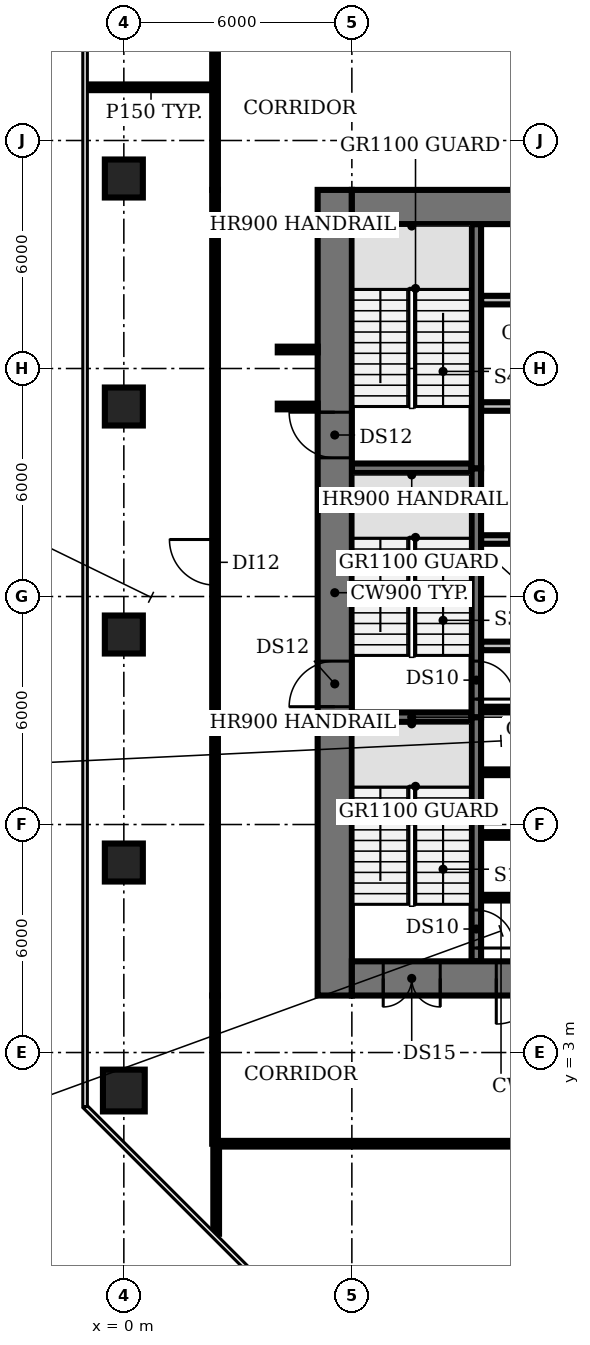
"""IFC4 building model, lengths in metres.
Left out: names, types, materials, properties, quantities, classifications, styles, units other than length and angle.
Written with IfcOpenShell. Run it as: python <this file> out.ifc"""

import sys

from ifc_helpers import new_model, si_unit, direction, frame, frame_2d, origin, origin_2d, place, context, subcontext, project, spatial, rectangle, circle, extrude, element, fill, save


model = new_model("IFC4")
c1 = context("Model", 3, precision=1e-05, world=origin(), true_north=direction((0.0, 1.0)))
c2 = subcontext(c1, "Body", "Model", "MODEL_VIEW")
j1 = project(units=[si_unit("LENGTHUNIT", "METRE"), si_unit("PLANEANGLEUNIT", "RADIAN")], contexts=[c1])
p1 = place(None, origin())
s1 = spatial("IfcSite", under=j1, at=p1, CompositionType="ELEMENT")
p2 = place(p1, origin())
s2 = spatial("IfcBuilding", under=s1, at=p2, CompositionType="ELEMENT")
p3 = place(p2, frame((0.0, 0.0, 15.5)))
s3 = spatial("IfcBuildingStorey", under=s2, at=p3, CompositionType="ELEMENT", Elevation=15.5)
p4 = place(p3, frame((0.0, 2.0, 0.0), z_axis=(0.0, 0.0, 1.0), x_axis=(1.0, 0.0, 0.0)))
e1 = element("IfcColumn", 1, at=p4, inside=s3, PredefinedType="COLUMN", context=c2, shape_type="SweptSolid", body=[
    extrude(circle(Radius=0.55, at=origin_2d()), origin(), (0.0, 0.0, 1.0), 4.15),
])
for number, where, z_axis, x_axis in (
    (2, (0.0, 8.0, 0.0), (0.0, 0.0, 1.0), (1.0, 0.0, 0.0)),
    (3, (0.0, 14.0, 0.0), (0.0, 0.0, 1.0), (1.0, 0.0, 0.0)),
    (4, (0.0, 20.0, 0.0), (0.0, 0.0, 1.0), (1.0, 0.0, 0.0)),
    (5, (0.0, 26.0, 0.0), (0.0, 0.0, 1.0), (1.0, 0.0, 0.0)),
):
    element("IfcColumn", number, at=place(p3, frame(where, z_axis=z_axis, x_axis=x_axis)), inside=s3, PredefinedType="COLUMN", context=c2, shape_type="SweptSolid", body=[
        extrude(rectangle(XDim=1.0, YDim=1.0, at=origin_2d()), origin(), (0.0, 0.0, 1.0), 4.15),
    ])
for number, where, z_axis, x_axis in (
    (6, (9.4, 7.075, 0.0), (0.0, 0.0, 1.0), (1.0, 0.0, 0.0)),
    (7, (9.4, 8.725, 0.0), (0.0, 0.0, 1.0), (1.0, 0.0, 0.0)),
    (8, (9.4, 10.375, 0.0), (0.0, 0.0, 1.0), (1.0, 0.0, 0.0)),
):
    element("IfcWall", number, at=place(p3, frame(where, z_axis=z_axis, x_axis=x_axis)), inside=s3, PredefinedType="SHEAR", context=c2, shape_type="SweptSolid", body=[
        extrude(rectangle(XDim=1.05, YDim=0.15, at=frame_2d((0.525, 0.0))), origin(), (0.0, 0.0, 1.0), 4.15),
    ])
p5 = place(p3, frame((6.0, 11.825, 0.0), z_axis=(0.0, 0.0, 1.0), x_axis=(1.0, 0.0, 0.0)))
e9 = element("IfcWall", 9, at=p5, inside=s3, PredefinedType="SHEAR", context=c2, shape_type="SweptSolid", body=[
    extrude(rectangle(XDim=3.15, YDim=0.25, at=frame_2d((1.575, 0.0))), origin(), (0.0, 0.0, 1.0), 4.15),
])
p6 = place(p3, frame((9.4, 12.025, 0.0), z_axis=(0.0, 0.0, 1.0), x_axis=(1.0, 0.0, 0.0)))
e10 = element("IfcWall", 10, at=p6, inside=s3, PredefinedType="SHEAR", context=c2, shape_type="SweptSolid", body=[
    extrude(rectangle(XDim=1.05, YDim=0.15, at=frame_2d((0.525, 0.0))), origin(), (0.0, 0.0, 1.0), 4.15),
])
p7 = place(p3, frame((9.4, 13.7, 0.0), z_axis=(0.0, 0.0, 1.0), x_axis=(1.0, 0.0, 0.0)))
e11 = element("IfcWall", 11, at=p7, inside=s3, PredefinedType="PARTITIONING", context=c2, shape_type="SweptSolid", body=[
    extrude(rectangle(XDim=4.0, YDim=0.225, at=frame_2d((2.0, 0.0))), origin(), (0.0, 0.0, 1.0), 4.15),
])
p8 = place(p3, frame((9.4, 16.5, 0.0), z_axis=(0.0, 0.0, 1.0), x_axis=(1.0, 0.0, 0.0)))
e12 = element("IfcWall", 12, at=p8, inside=s3, PredefinedType="PARTITIONING", context=c2, shape_type="SweptSolid", body=[
    extrude(rectangle(XDim=14.6, YDim=0.225, at=frame_2d((7.3, 0.0))), origin(), (0.0, 0.0, 1.0), 4.15),
])
p9 = place(p8, frame((0.75, 0.0, 0.0)))
e13 = element("IfcOpeningElement", 13, at=p9, cuts=e12, PredefinedType="OPENING", context=c2, shape_type="SweptSolid", body=[
    extrude(rectangle(XDim=1.1, YDim=2.1, at=frame_2d((0.55, 1.05))), frame((0.0, 0.123, 0.0), z_axis=(0.0, -1.0, 0.0), x_axis=(1.0, 0.0, 0.0)), (0.0, 0.0, 1.0), 0.245),
])
p10 = place(p8, frame((3.55, 0.0, 0.0)))
e14 = element("IfcOpeningElement", 14, at=p10, cuts=e12, PredefinedType="OPENING", context=c2, shape_type="SweptSolid", body=[
    extrude(rectangle(XDim=1.1, YDim=2.1, at=frame_2d((0.55, 1.05))), frame((0.0, 0.123, 0.0), z_axis=(0.0, -1.0, 0.0), x_axis=(1.0, 0.0, 0.0)), (0.0, 0.0, 1.0), 0.245),
])
p11 = place(p8, frame((6.35, 0.0, 0.0)))
e15 = element("IfcOpeningElement", 15, at=p11, cuts=e12, PredefinedType="OPENING", context=c2, shape_type="SweptSolid", body=[
    extrude(rectangle(XDim=1.1, YDim=2.1, at=frame_2d((0.55, 1.05))), frame((0.0, 0.123, 0.0), z_axis=(0.0, -1.0, 0.0), x_axis=(1.0, 0.0, 0.0)), (0.0, 0.0, 1.0), 0.245),
])
p12 = place(p8, frame((9.15, 0.0, 0.0)))
e16 = element("IfcOpeningElement", 16, at=p12, cuts=e12, PredefinedType="OPENING", context=c2, shape_type="SweptSolid", body=[
    extrude(rectangle(XDim=1.1, YDim=2.1, at=frame_2d((0.55, 1.05))), frame((0.0, 0.123, 0.0), z_axis=(0.0, -1.0, 0.0), x_axis=(1.0, 0.0, 0.0)), (0.0, 0.0, 1.0), 0.245),
])
p13 = place(p8, frame((11.647, 0.0, 0.0)))
e17 = element("IfcOpeningElement", 17, at=p13, cuts=e12, PredefinedType="OPENING", context=c2, shape_type="SweptSolid", body=[
    extrude(rectangle(XDim=0.9, YDim=2.1, at=frame_2d((0.45, 1.05))), frame((0.0, 0.123, 0.0), z_axis=(0.0, -1.0, 0.0), x_axis=(1.0, 0.0, 0.0)), (0.0, 0.0, 1.0), 0.245),
])
p14 = place(p8, frame((13.423, 0.0, 0.0)))
e18 = element("IfcOpeningElement", 18, at=p14, cuts=e12, PredefinedType="OPENING", context=c2, shape_type="SweptSolid", body=[
    extrude(rectangle(XDim=0.9, YDim=2.1, at=frame_2d((0.45, 1.05))), frame((0.0, 0.123, 0.0), z_axis=(0.0, -1.0, 0.0), x_axis=(1.0, 0.0, 0.0)), (0.0, 0.0, 1.0), 0.245),
])
p15 = place(p3, frame((6.0, 18.375, 0.0), z_axis=(0.0, 0.0, 1.0), x_axis=(1.0, 0.0, 0.0)))
e19 = element("IfcWall", 19, at=p15, inside=s3, PredefinedType="SHEAR", context=c2, shape_type="SweptSolid", body=[
    extrude(rectangle(XDim=3.15, YDim=0.25, at=frame_2d((1.575, 0.0))), origin(), (0.0, 0.0, 1.0), 4.15),
])
p16 = place(p3, frame((24.0, 20.0, 0.0), z_axis=(0.0, 0.0, 1.0), x_axis=(-1.0, 0.0, 0.0)))
e20 = element("IfcWall", 20, at=p16, inside=s3, PredefinedType="PARTITIONING", context=c2, shape_type="SweptSolid", body=[
    extrude(rectangle(XDim=14.6, YDim=0.225, at=frame_2d((7.3, 0.0))), origin(), (0.0, 0.0, 1.0), 4.15),
])
p17 = place(p16, frame((12.2, 0.0, 0.0)))
e21 = element("IfcOpeningElement", 21, at=p17, cuts=e20, PredefinedType="OPENING", context=c2, shape_type="SweptSolid", body=[
    extrude(rectangle(XDim=1.0, YDim=2.1, at=frame_2d((0.5, 1.05))), frame((0.0, 0.123, 0.0), z_axis=(0.0, -1.0, 0.0), x_axis=(1.0, 0.0, 0.0)), (0.0, 0.0, 1.0), 0.245),
])
p18 = place(p16, frame((9.025, 0.0, 0.0)))
e22 = element("IfcOpeningElement", 22, at=p18, cuts=e20, PredefinedType="OPENING", context=c2, shape_type="SweptSolid", body=[
    extrude(rectangle(XDim=0.9, YDim=2.1, at=frame_2d((0.45, 1.05))), frame((0.0, 0.123, 0.0), z_axis=(0.0, -1.0, 0.0), x_axis=(1.0, 0.0, 0.0)), (0.0, 0.0, 1.0), 0.245),
])
p19 = place(p16, frame((5.375, 0.0, 0.0)))
e23 = element("IfcOpeningElement", 23, at=p19, cuts=e20, PredefinedType="OPENING", context=c2, shape_type="SweptSolid", body=[
    extrude(rectangle(XDim=1.0, YDim=2.1, at=frame_2d((0.5, 1.05))), frame((0.0, 0.123, 0.0), z_axis=(0.0, -1.0, 0.0), x_axis=(1.0, 0.0, 0.0)), (0.0, 0.0, 1.0), 0.245),
])
p20 = place(p16, frame((2.137, 0.0, 0.0)))
e24 = element("IfcOpeningElement", 24, at=p20, cuts=e20, PredefinedType="OPENING", context=c2, shape_type="SweptSolid", body=[
    extrude(rectangle(XDim=0.9, YDim=2.1, at=frame_2d((0.45, 1.05))), frame((0.0, 0.123, 0.0), z_axis=(0.0, -1.0, 0.0), x_axis=(1.0, 0.0, 0.0)), (0.0, 0.0, 1.0), 0.245),
])
p21 = place(p16, frame((0.363, 0.0, 0.0)))
e25 = element("IfcOpeningElement", 25, at=p21, cuts=e20, PredefinedType="OPENING", context=c2, shape_type="SweptSolid", body=[
    extrude(rectangle(XDim=0.9, YDim=2.1, at=frame_2d((0.45, 1.05))), frame((0.0, 0.123, 0.0), z_axis=(0.0, -1.0, 0.0), x_axis=(1.0, 0.0, 0.0)), (0.0, 0.0, 1.0), 0.245),
])
p22 = place(p3, frame((9.4, 22.8, 0.0), z_axis=(0.0, 0.0, 1.0), x_axis=(1.0, 0.0, 0.0)))
e26 = element("IfcWall", 26, at=p22, inside=s3, PredefinedType="PARTITIONING", context=c2, shape_type="SweptSolid", body=[
    extrude(rectangle(XDim=14.6, YDim=0.225, at=frame_2d((7.3, 0.0))), origin(), (0.0, 0.0, 1.0), 4.15),
])
p23 = place(p3, frame((9.275, 11.825, 0.0), z_axis=(0.0, 0.0, 1.0), x_axis=(0.0, -1.0, 0.0)))
e27 = element("IfcWall", 27, at=p23, inside=s3, PredefinedType="SHEAR", context=c2, shape_type="SweptSolid", body=[
    extrude(rectangle(XDim=6.425, YDim=0.25, at=frame_2d((3.212, 0.0))), origin(), (0.0, 0.0, 1.0), 4.15),
])
p24 = place(p23, frame((5.075, 0.0, 0.0)))
e28 = element("IfcOpeningElement", 28, at=p24, cuts=e27, PredefinedType="OPENING", context=c2, shape_type="SweptSolid", body=[
    extrude(rectangle(XDim=1.0, YDim=2.1, at=frame_2d((0.5, 1.05))), frame((0.0, 0.135, 0.0), z_axis=(0.0, -1.0, 0.0), x_axis=(1.0, 0.0, 0.0)), (0.0, 0.0, 1.0), 0.27),
])
p25 = place(p3, frame((9.275, 18.375, 0.0), z_axis=(0.0, 0.0, 1.0), x_axis=(0.0, -1.0, 0.0)))
e29 = element("IfcWall", 29, at=p25, inside=s3, PredefinedType="SHEAR", context=c2, shape_type="SweptSolid", body=[
    extrude(rectangle(XDim=6.55, YDim=0.25, at=frame_2d((3.275, 0.0))), origin(), (0.0, 0.0, 1.0), 4.15),
])
p26 = place(p25, frame((5.075, 0.0, 0.0)))
e30 = element("IfcOpeningElement", 30, at=p26, cuts=e29, PredefinedType="OPENING", context=c2, shape_type="SweptSolid", body=[
    extrude(rectangle(XDim=1.0, YDim=2.1, at=frame_2d((0.5, 1.05))), frame((0.0, 0.135, 0.0), z_axis=(0.0, -1.0, 0.0), x_axis=(1.0, 0.0, 0.0)), (0.0, 0.0, 1.0), 0.27),
])
p27 = place(p3, frame((9.275, 18.375, 0.0), z_axis=(0.0, 0.0, 1.0), x_axis=(0.0, 1.0, 0.0)))
e31 = element("IfcWall", 31, at=p27, inside=s3, PredefinedType="SHEAR", context=c2, shape_type="SweptSolid", body=[
    extrude(rectangle(XDim=6.425, YDim=0.25, at=frame_2d((3.212, 0.0))), origin(), (0.0, 0.0, 1.0), 4.15),
])
p28 = place(p3, frame((5.55, 4.5, 0.0), z_axis=(0.0, 0.0, 1.0), x_axis=(0.0, 1.0, 0.0)))
e32 = element("IfcWall", 32, at=p28, inside=s3, PredefinedType="SHEAR", context=c2, shape_type="SweptSolid", body=[
    extrude(rectangle(XDim=21.2, YDim=0.9, at=frame_2d((10.6, 0.0))), origin(), (0.0, 0.0, 1.0), 4.15),
])
p29 = place(p28, frame((7.6, 0.0, 0.0)))
e33 = element("IfcOpeningElement", 33, at=p29, cuts=e32, PredefinedType="OPENING", context=c2, shape_type="SweptSolid", body=[
    extrude(rectangle(XDim=1.2, YDim=2.1, at=frame_2d((0.6, 1.05))), frame((0.0, 0.46, 0.0), z_axis=(0.0, -1.0, 0.0), x_axis=(1.0, 0.0, 0.0)), (0.0, 0.0, 1.0), 0.92),
])
p30 = place(p28, frame((14.15, 0.0, 0.0)))
e34 = element("IfcOpeningElement", 34, at=p30, cuts=e32, PredefinedType="OPENING", context=c2, shape_type="SweptSolid", body=[
    extrude(rectangle(XDim=1.2, YDim=2.1, at=frame_2d((0.6, 1.05))), frame((0.0, 0.46, 0.0), z_axis=(0.0, -1.0, 0.0), x_axis=(1.0, 0.0, 0.0)), (0.0, 0.0, 1.0), 0.92),
])
p31 = place(p3, frame((24.0, 4.95, 0.0), z_axis=(0.0, 0.0, 1.0), x_axis=(-1.0, 0.0, 0.0)))
e35 = element("IfcWall", 35, at=p31, inside=s3, PredefinedType="SHEAR", context=c2, shape_type="SweptSolid", body=[
    extrude(rectangle(XDim=18.0, YDim=0.9, at=frame_2d((9.0, 0.0))), origin(), (0.0, 0.0, 1.0), 4.15),
])
p32 = place(p31, frame((15.675, 0.0, 0.0)))
e36 = element("IfcOpeningElement", 36, at=p32, cuts=e35, PredefinedType="OPENING", context=c2, shape_type="SweptSolid", body=[
    extrude(rectangle(XDim=1.5, YDim=2.1, at=frame_2d((0.75, 1.05))), frame((0.0, 0.46, 0.0), z_axis=(0.0, -1.0, 0.0), x_axis=(1.0, 0.0, 0.0)), (0.0, 0.0, 1.0), 0.92),
])
p33 = place(p31, frame((0.825, 0.0, 0.0)))
e37 = element("IfcOpeningElement", 37, at=p33, cuts=e35, PredefinedType="OPENING", context=c2, shape_type="SweptSolid", body=[
    extrude(rectangle(XDim=1.5, YDim=2.1, at=frame_2d((0.75, 1.05))), frame((0.0, 0.46, 0.0), z_axis=(0.0, -1.0, 0.0), x_axis=(1.0, 0.0, 0.0)), (0.0, 0.0, 1.0), 0.92),
])
p34 = place(p31, frame((13.0, 0.0, 0.0)))
e38 = element("IfcOpeningElement", 38, at=p34, cuts=e35, PredefinedType="OPENING", context=c2, shape_type="SweptSolid", body=[
    extrude(rectangle(XDim=1.2, YDim=2.1, at=frame_2d((0.6, 1.05))), frame((0.0, 0.46, 0.0), z_axis=(0.0, -1.0, 0.0), x_axis=(1.0, 0.0, 0.0)), (0.0, 0.0, 1.0), 0.92),
])
p35 = place(p31, frame((4.9, 0.0, 0.0)))
e39 = element("IfcOpeningElement", 39, at=p35, cuts=e35, PredefinedType="OPENING", context=c2, shape_type="SweptSolid", body=[
    extrude(rectangle(XDim=1.0, YDim=2.1, at=frame_2d((0.5, 1.05))), frame((0.0, 0.46, 0.0), z_axis=(0.0, -1.0, 0.0), x_axis=(1.0, 0.0, 0.0)), (0.0, 0.0, 1.0), 0.92),
])
p36 = place(p3, frame((6.0, 25.25, 0.0), z_axis=(0.0, 0.0, 1.0), x_axis=(1.0, 0.0, 0.0)))
e40 = element("IfcWall", 40, at=p36, inside=s3, PredefinedType="SHEAR", context=c2, shape_type="SweptSolid", body=[
    extrude(rectangle(XDim=18.0, YDim=0.9, at=frame_2d((9.0, 0.0))), origin(), (0.0, 0.0, 1.0), 4.15),
])
p37 = place(p3, frame((-0.97, 28.4, 0.0), z_axis=(0.0, 0.0, 1.0), x_axis=(1.0, 0.0, 0.0)))
e41 = element("IfcWall", 41, at=p37, inside=s3, PredefinedType="PARTITIONING", context=c2, shape_type="SweptSolid", body=[
    extrude(rectangle(XDim=3.37, YDim=0.15, at=frame_2d((1.685, 0.0))), origin(), (0.0, 0.0, 1.0), 3.08),
])
p38 = place(p3, frame((2.4, 0.6, 0.0), z_axis=(0.0, 0.0, 1.0), x_axis=(0.0, 1.0, 0.0)))
e42 = element("IfcWall", 42, at=p38, inside=s3, PredefinedType="PARTITIONING", context=c2, shape_type="SweptSolid", body=[
    extrude(rectangle(XDim=3.9, YDim=0.15, at=frame_2d((1.95, 0.0))), origin(), (0.0, 0.0, 1.0), 3.08),
])
p39 = place(p3, frame((2.4, 4.5, 0.0), z_axis=(0.0, 0.0, 1.0), x_axis=(0.0, 1.0, 0.0)))
e43 = element("IfcWall", 43, at=p39, inside=s3, PredefinedType="PARTITIONING", context=c2, shape_type="SweptSolid", body=[
    extrude(rectangle(XDim=21.2, YDim=0.15, at=frame_2d((10.6, 0.0))), origin(), (0.0, 0.0, 1.0), 3.08),
])
p40 = place(p39, frame((10.8, 0.0, 0.0)))
e44 = element("IfcOpeningElement", 44, at=p40, cuts=e43, PredefinedType="OPENING", context=c2, shape_type="SweptSolid", body=[
    extrude(rectangle(XDim=1.2, YDim=2.1, at=frame_2d((0.6, 1.05))), frame((0.0, 0.085, 0.0), z_axis=(0.0, -1.0, 0.0), x_axis=(1.0, 0.0, 0.0)), (0.0, 0.0, 1.0), 0.17),
])
p41 = place(p3, frame((2.4, 25.7, 0.0), z_axis=(0.0, 0.0, 1.0), x_axis=(0.0, 1.0, 0.0)))
e45 = element("IfcWall", 45, at=p41, inside=s3, PredefinedType="PARTITIONING", context=c2, shape_type="SweptSolid", body=[
    extrude(rectangle(XDim=3.9, YDim=0.15, at=frame_2d((1.95, 0.0))), origin(), (0.0, 0.0, 1.0), 3.08),
])
p42 = place(p3, frame((2.43, -1.77, 0.0), z_axis=(0.0, 0.0, 1.0), x_axis=(0.0, 1.0, 0.0)))
e46 = element("IfcWall", 46, at=p42, inside=s3, PredefinedType="PARTITIONING", context=c2, shape_type="SweptSolid", body=[
    extrude(rectangle(XDim=2.37, YDim=0.15, at=frame_2d((1.185, 0.0))), origin(), (0.0, 0.0, 1.0), 3.08),
])
for number, where, z_axis, x_axis in (
    (47, (4.05, 20.0, 0.0), (0.0, 0.0, 1.0), (1.0, 0.0, 0.0)),
    (48, (4.05, 21.5, 0.0), (0.0, 0.0, 1.0), (1.0, 0.0, 0.0)),
):
    element("IfcWall", number, at=place(p3, frame(where, z_axis=z_axis, x_axis=x_axis)), inside=s3, PredefinedType="PARTITIONING", context=c2, shape_type="SweptSolid", body=[
        extrude(rectangle(XDim=1.05, YDim=0.15, at=frame_2d((0.525, 0.0))), origin(), (0.0, 0.0, 1.0), 3.08),
    ])
p43 = place(p3, frame((27.6, 0.6, 0.0), z_axis=(0.0, 0.0, 1.0), x_axis=(-1.0, 0.0, 0.0)))
e49 = element("IfcWall", 49, at=p43, inside=s3, PredefinedType="PARTITIONING", context=c2, shape_type="SweptSolid", body=[
    extrude(rectangle(XDim=25.2, YDim=0.15, at=frame_2d((12.6, 0.0))), origin(), (0.0, 0.0, 1.0), 3.08),
])
p44 = place(p43, frame((12.1, 0.0, 0.0)))
e50 = element("IfcOpeningElement", 50, at=p44, cuts=e49, PredefinedType="OPENING", context=c2, shape_type="SweptSolid", body=[
    extrude(rectangle(XDim=1.2, YDim=2.1, at=frame_2d((0.6, 1.05))), frame((0.0, 0.085, 0.0), z_axis=(0.0, -1.0, 0.0), x_axis=(1.0, 0.0, 0.0)), (0.0, 0.0, 1.0), 0.17),
])
p45 = place(p24, origin())
e51 = element("IfcDoor", 51, at=p45, inside=s3, OperationType="SINGLE_SWING_RIGHT", PredefinedType="DOOR", context=c2, shape_type="SweptSolid", body=[
    extrude(rectangle(XDim=1.0, YDim=2.1, at=frame_2d((0.5, 1.05))), frame((0.0, 0.025, 0.0), z_axis=(0.0, -1.0, 0.0), x_axis=(1.0, 0.0, 0.0)), (0.0, 0.0, 1.0), 0.05),
])
fill(e28, e51)
p46 = place(p26, origin())
e52 = element("IfcDoor", 52, at=p46, inside=s3, OperationType="SINGLE_SWING_RIGHT", PredefinedType="DOOR", context=c2, shape_type="SweptSolid", body=[
    extrude(rectangle(XDim=1.0, YDim=2.1, at=frame_2d((0.5, 1.05))), frame((0.0, 0.025, 0.0), z_axis=(0.0, -1.0, 0.0), x_axis=(1.0, 0.0, 0.0)), (0.0, 0.0, 1.0), 0.05),
])
fill(e30, e52)
p47 = place(p29, origin())
e53 = element("IfcDoor", 53, at=p47, inside=s3, OperationType="SINGLE_SWING_LEFT", PredefinedType="DOOR", context=c2, shape_type="SweptSolid", body=[
    extrude(rectangle(XDim=1.2, YDim=2.1, at=frame_2d((0.6, 1.05))), frame((0.0, 0.025, 0.0), z_axis=(0.0, -1.0, 0.0), x_axis=(1.0, 0.0, 0.0)), (0.0, 0.0, 1.0), 0.05),
])
fill(e33, e53)
p48 = place(p30, origin())
e54 = element("IfcDoor", 54, at=p48, inside=s3, OperationType="SINGLE_SWING_RIGHT", PredefinedType="DOOR", context=c2, shape_type="SweptSolid", body=[
    extrude(rectangle(XDim=1.2, YDim=2.1, at=frame_2d((0.6, 1.05))), frame((0.0, 0.025, 0.0), z_axis=(0.0, -1.0, 0.0), x_axis=(1.0, 0.0, 0.0)), (0.0, 0.0, 1.0), 0.05),
])
fill(e34, e54)
p49 = place(p32, origin())
e55 = element("IfcDoor", 55, at=p49, inside=s3, OperationType="DOUBLE_DOOR_SINGLE_SWING", PredefinedType="DOOR", context=c2, shape_type="SweptSolid", body=[
    extrude(rectangle(XDim=1.5, YDim=2.1, at=frame_2d((0.75, 1.05))), frame((0.0, 0.025, 0.0), z_axis=(0.0, -1.0, 0.0), x_axis=(1.0, 0.0, 0.0)), (0.0, 0.0, 1.0), 0.05),
])
fill(e36, e55)
p50 = place(p34, origin())
e56 = element("IfcDoor", 56, at=p50, inside=s3, OperationType="SINGLE_SWING_RIGHT", PredefinedType="DOOR", context=c2, shape_type="SweptSolid", body=[
    extrude(rectangle(XDim=1.2, YDim=2.1, at=frame_2d((0.6, 1.05))), frame((0.0, 0.025, 0.0), z_axis=(0.0, -1.0, 0.0), x_axis=(1.0, 0.0, 0.0)), (0.0, 0.0, 1.0), 0.05),
])
fill(e38, e56)
p51 = place(p40, origin())
e57 = element("IfcDoor", 57, at=p51, inside=s3, OperationType="SINGLE_SWING_RIGHT", PredefinedType="DOOR", context=c2, shape_type="SweptSolid", body=[
    extrude(rectangle(XDim=1.2, YDim=2.1, at=frame_2d((0.6, 1.05))), frame((0.0, 0.025, 0.0), z_axis=(0.0, -1.0, 0.0), x_axis=(1.0, 0.0, 0.0)), (0.0, 0.0, 1.0), 0.05),
])
fill(e44, e57)
save(model, sys.argv[1])
